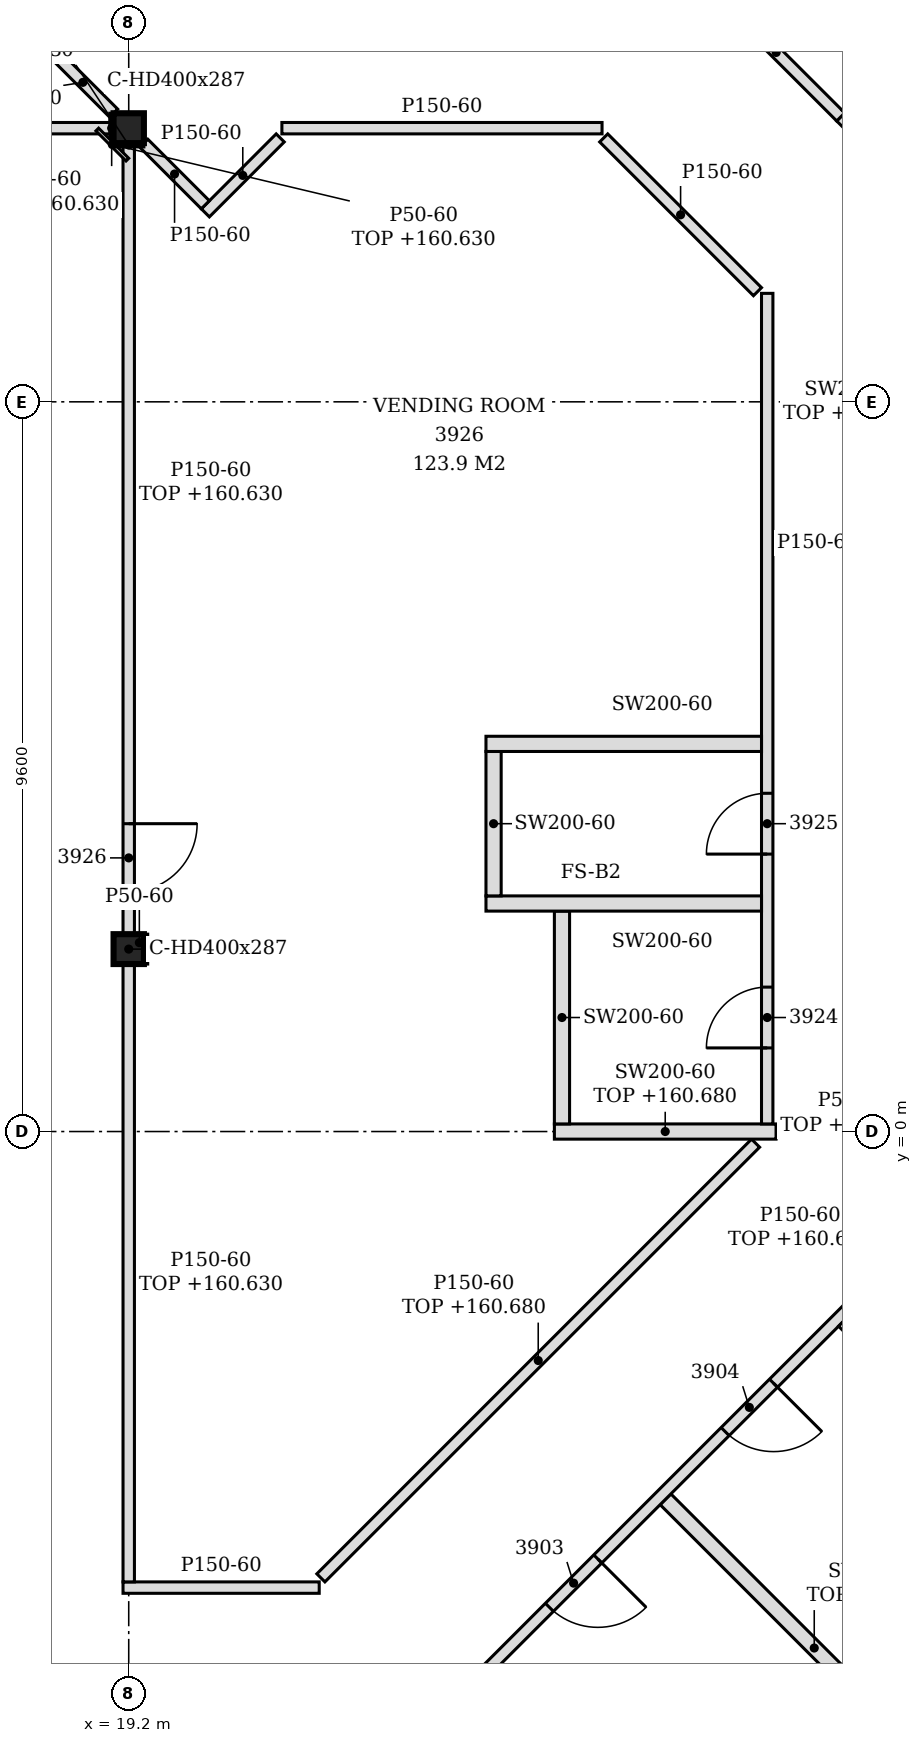
"""IFC4 building model, lengths in metres.
Left out: names, types, materials, properties, quantities, classifications, styles, units other than length and angle.
Written with IfcOpenShell. Run it as: python <this file> out.ifc"""

import sys

from ifc_helpers import new_model, si_unit, direction, frame, frame_2d, origin, origin_2d, place, context, subcontext, project, spatial, polyline, rectangle, i_section, outline, extrude, element, fill, save


model = new_model("IFC4")
c1 = context("Model", 3, precision=1e-05, world=origin(), true_north=direction((0.0, 1.0)))
c2 = subcontext(c1, "Body", "Model", "MODEL_VIEW")
j1 = project(units=[si_unit("LENGTHUNIT", "METRE"), si_unit("PLANEANGLEUNIT", "RADIAN")], contexts=[c1])
p1 = place(None, origin())
s1 = spatial("IfcSite", under=j1, at=p1, CompositionType="ELEMENT")
p2 = place(p1, origin())
s2 = spatial("IfcBuilding", under=s1, at=p2, CompositionType="ELEMENT")
p3 = place(p2, frame((0.0, 0.0, 157.8)))
s3 = spatial("IfcBuildingStorey", under=s2, at=p3, CompositionType="ELEMENT", Elevation=157.8)
for number, where, z_axis, x_axis in (
    (1, (19.2, 2.4, -0.15), (0.0, 0.0, 1.0), (1.0, 0.0, 0.0)),
    (2, (19.2, 13.2, -0.15), (0.0, 0.0, 1.0), (1.0, 0.0, 0.0)),
):
    element("IfcColumn", number, at=place(p3, frame(where, z_axis=z_axis, x_axis=x_axis)), inside=s3, PredefinedType="COLUMN", context=c2, shape_type="SweptSolid", body=[
        extrude(i_section(OverallWidth=0.399, OverallDepth=0.393, WebThickness=0.023, FlangeThickness=0.037, FilletRadius=0.015, at=origin_2d()), origin(), (0.0, 0.0, 1.0), 3.6),
    ])
p4 = place(p3, frame((30.176, -8.752, 0.0), z_axis=(0.0, 0.0, 1.0), x_axis=(-0.707084725798, 0.707128835887, 0.0)))
e3 = element("IfcWall", 3, at=p4, inside=s3, PredefinedType="PARTITIONING", context=c2, shape_type="SweptSolid", body=[
    extrude(rectangle(XDim=5.535, YDim=0.2, at=frame_2d((2.768, 0.0))), origin(), (0.0, 0.0, 1.0), 2.88),
])
p5 = place(p3, frame((22.722, -8.272, 0.0), z_axis=(0.0, 0.0, 1.0), x_axis=(0.707106781187, 0.707106781187, 0.0)))
e4 = element("IfcWall", 4, at=p5, inside=s3, PredefinedType="PARTITIONING", context=c2, shape_type="SweptSolid", body=[
    extrude(rectangle(XDim=10.399, YDim=0.15, at=frame_2d((5.199, 0.0))), origin(), (0.0, 0.0, 1.0), 2.88),
])
p6 = place(p5, frame((2.846, 0.0, 0.0)))
e5 = element("IfcOpeningElement", 5, at=p6, cuts=e4, PredefinedType="OPENING", context=c2, shape_type="SweptSolid", body=[
    extrude(rectangle(XDim=0.9, YDim=2.1, at=frame_2d((0.45, 1.05))), frame((0.0, 0.085, 0.0), z_axis=(0.0, -1.0, 0.0), x_axis=(1.0, 0.0, 0.0)), (0.0, 0.0, 1.0), 0.17),
])
p7 = place(p5, frame((6.116, 0.0, 0.0)))
e6 = element("IfcOpeningElement", 6, at=p7, cuts=e4, PredefinedType="OPENING", context=c2, shape_type="SweptSolid", body=[
    extrude(rectangle(XDim=0.9, YDim=2.1, at=frame_2d((0.45, 1.05))), frame((0.0, 0.085, 0.0), z_axis=(0.0, -1.0, 0.0), x_axis=(1.0, 0.0, 0.0)), (0.0, 0.0, 1.0), 0.17),
])
p8 = place(p3, frame((33.155, -7.107, 0.0), z_axis=(0.0, 0.0, 1.0), x_axis=(-0.70708794033, 0.707125621541, 0.0)))
e7 = element("IfcWall", 7, at=p8, inside=s3, PredefinedType="PARTITIONING", context=c2, shape_type="SweptSolid", body=[
    extrude(rectangle(XDim=6.479, YDim=0.1, at=frame_2d((3.24, 0.0))), origin(), (0.0, 0.0, 1.0), 2.88),
])
p9 = place(p8, frame((2.637, 0.0, 0.0)))
e8 = element("IfcOpeningElement", 8, at=p9, cuts=e7, PredefinedType="OPENING", context=c2, shape_type="SweptSolid", body=[
    extrude(rectangle(XDim=0.9, YDim=2.1, at=frame_2d((0.45, 1.05))), frame((0.0, 0.06, 0.0), z_axis=(0.0, -1.0, 0.0), x_axis=(1.0, 0.0, 0.0)), (0.0, 0.0, 1.0), 0.12),
])
p10 = place(p3, frame((19.125, -6.0, 0.0), z_axis=(0.0, 0.0, 1.0), x_axis=(1.0, 0.0, 0.0)))
e9 = element("IfcWall", 9, at=p10, inside=s3, PredefinedType="PARTITIONING", context=c2, shape_type="SweptSolid", body=[
    extrude(outline(polyline([(0.0, 0.0), (2.581, 0.0), (2.581, 3.45), (0.225, 3.45), (0.223, 2.83), (0.0, 2.83), (0.0, 0.0)])), frame((0.0, 0.075, 0.0), z_axis=(0.0, -1.0, 0.0), x_axis=(1.0, 0.0, 0.0)), (0.0, 0.0, 1.0), 0.15),
])
p11 = place(p3, frame((19.2, -5.925, 0.0), z_axis=(0.0, 0.0, 1.0), x_axis=(0.0, 1.0, 0.0)))
e10 = element("IfcWall", 10, at=p11, inside=s3, PredefinedType="PARTITIONING", context=c2, shape_type="SweptSolid", body=[
    extrude(rectangle(XDim=8.129, YDim=0.15, at=frame_2d((4.064, 0.0))), origin(), (0.0, 0.0, 1.0), 2.83),
])
p12 = place(p3, frame((21.728, -5.872, 0.0), z_axis=(0.0, 0.0, 1.0), x_axis=(0.707106781187, 0.707106781187, 0.0)))
e11 = element("IfcWall", 11, at=p12, inside=s3, PredefinedType="PARTITIONING", context=c2, shape_type="SweptSolid", body=[
    extrude(rectangle(XDim=8.088, YDim=0.15, at=frame_2d((4.044, 0.0))), origin(), (0.0, 0.0, 1.0), 2.88),
])
p13 = place(p3, frame((24.8, 0.0, 0.0), z_axis=(0.0, 0.0, 1.0), x_axis=(1.0, 0.0, 0.0)))
e12 = element("IfcWall", 12, at=p13, inside=s3, PredefinedType="PARTITIONING", context=c2, shape_type="SweptSolid", body=[
    extrude(rectangle(XDim=2.916, YDim=0.2, at=frame_2d((1.458, 0.0))), origin(), (0.0, 0.0, 1.0), 2.88),
])
p14 = place(p3, frame((24.9, 0.1, 0.0), z_axis=(0.0, 0.0, 1.0), x_axis=(0.0, 1.0, 0.0)))
e13 = element("IfcWall", 13, at=p14, inside=s3, PredefinedType="PARTITIONING", context=c2, shape_type="SweptSolid", body=[
    extrude(outline(polyline([(0.0, 0.0), (2.8, 0.0), (2.8, 3.45), (0.005, 3.45), (0.003, 2.88), (0.0, 2.88), (0.0, 0.0)])), frame((0.0, 0.1, 0.0), z_axis=(0.0, -1.0, 0.0), x_axis=(1.0, 0.0, 0.0)), (0.0, 0.0, 1.0), 0.2),
])
p15 = place(p3, frame((27.6, 0.1, 0.0), z_axis=(0.0, 0.0, 1.0), x_axis=(0.0, 1.0, 0.0)))
e14 = element("IfcWall", 14, at=p15, inside=s3, PredefinedType="PARTITIONING", context=c2, shape_type="SweptSolid", body=[
    extrude(outline(polyline([(0.0, 0.0), (10.927, 0.0), (10.927, 3.45), (9.605, 3.45), (9.603, 2.88), (9.395, 2.88), (9.393, 3.45), (4.805, 3.45), (4.803, 2.88), (4.595, 2.88), (4.593, 3.45), (0.005, 3.45), (0.003, 2.88), (0.0, 2.88), (0.0, 0.0)])), frame((0.0, 0.075, 0.0), z_axis=(0.0, -1.0, 0.0), x_axis=(1.0, 0.0, 0.0)), (0.0, 0.0, 1.0), 0.15),
])
p16 = place(p15, frame((1.0, 0.0, 0.0)))
e15 = element("IfcOpeningElement", 15, at=p16, cuts=e14, PredefinedType="OPENING", context=c2, shape_type="SweptSolid", body=[
    extrude(rectangle(XDim=0.8, YDim=2.1, at=frame_2d((0.4, 1.05))), frame((0.0, 0.085, 0.0), z_axis=(0.0, -1.0, 0.0), x_axis=(1.0, 0.0, 0.0)), (0.0, 0.0, 1.0), 0.17),
])
p17 = place(p15, frame((3.55, 0.0, 0.0)))
e16 = element("IfcOpeningElement", 16, at=p17, cuts=e14, PredefinedType="OPENING", context=c2, shape_type="SweptSolid", body=[
    extrude(rectangle(XDim=0.8, YDim=2.1, at=frame_2d((0.4, 1.05))), frame((0.0, 0.085, 0.0), z_axis=(0.0, -1.0, 0.0), x_axis=(1.0, 0.0, 0.0)), (0.0, 0.0, 1.0), 0.17),
])
p18 = place(p3, frame((19.2, 2.596, 0.0), z_axis=(0.0, 0.0, 1.0), x_axis=(0.0, 1.0, 0.0)))
e17 = element("IfcWall", 17, at=p18, inside=s3, PredefinedType="PARTITIONING", context=c2, shape_type="SweptSolid", body=[
    extrude(rectangle(XDim=10.407, YDim=0.15, at=frame_2d((5.204, 0.0))), origin(), (0.0, 0.0, 1.0), 2.83),
])
p19 = place(p18, frame((0.553, 0.0, 0.0)))
e18 = element("IfcOpeningElement", 18, at=p19, cuts=e17, PredefinedType="OPENING", context=c2, shape_type="SweptSolid", body=[
    extrude(rectangle(XDim=0.9, YDim=2.1, at=frame_2d((0.45, 1.05))), frame((0.0, 0.085, 0.0), z_axis=(0.0, -1.0, 0.0), x_axis=(1.0, 0.0, 0.0)), (0.0, 0.0, 1.0), 0.17),
])
p20 = place(p3, frame((23.9, 3.0, 0.0), z_axis=(0.0, 0.0, 1.0), x_axis=(1.0, 0.0, 0.0)))
e19 = element("IfcWall", 19, at=p20, inside=s3, PredefinedType="PARTITIONING", context=c2, shape_type="SweptSolid", body=[
    extrude(rectangle(XDim=3.625, YDim=0.2, at=frame_2d((1.812, 0.0))), origin(), (0.0, 0.0, 1.0), 3.45),
])
p21 = place(p3, frame((24.0, 3.1, 0.0), z_axis=(0.0, 0.0, 1.0), x_axis=(0.0, 1.0, 0.0)))
e20 = element("IfcWall", 20, at=p21, inside=s3, PredefinedType="PARTITIONING", context=c2, shape_type="SweptSolid", body=[
    extrude(outline(polyline([(0.0, 0.0), (1.9, 0.0), (1.9, 3.45), (1.805, 3.45), (1.803, 2.88), (1.595, 2.88), (1.593, 3.45), (0.0, 3.45), (0.0, 0.0)])), frame((0.0, 0.1, 0.0), z_axis=(0.0, -1.0, 0.0), x_axis=(1.0, 0.0, 0.0)), (0.0, 0.0, 1.0), 0.2),
])
p22 = place(p3, frame((23.9, 5.1, 0.0), z_axis=(0.0, 0.0, 1.0), x_axis=(1.0, 0.0, 0.0)))
e21 = element("IfcWall", 21, at=p22, inside=s3, PredefinedType="PARTITIONING", context=c2, shape_type="SweptSolid", body=[
    extrude(rectangle(XDim=3.625, YDim=0.2, at=frame_2d((1.812, 0.0))), origin(), (0.0, 0.0, 1.0), 3.45),
])
p23 = place(p3, frame((27.472, 11.049, 0.0), z_axis=(0.0, 0.0, 1.0), x_axis=(-0.707106781187, 0.707106781187, 0.0)))
e22 = element("IfcWall", 22, at=p23, inside=s3, PredefinedType="PARTITIONING", context=c2, shape_type="SweptSolid", body=[
    extrude(rectangle(XDim=2.861, YDim=0.15, at=frame_2d((1.43, 0.0))), origin(), (0.0, 0.0, 1.0), 3.45),
])
p24 = place(p3, frame((29.872, 12.043, 0.0), z_axis=(0.0, 0.0, 1.0), x_axis=(-0.707172918471, 0.707040637716, 0.0)))
e23 = element("IfcWall", 23, at=p24, inside=s3, PredefinedType="PARTITIONING", context=c2, shape_type="SweptSolid", body=[
    extrude(rectangle(XDim=1.846, YDim=0.15, at=frame_2d((0.923, 0.0))), origin(), (0.0, 0.0, 1.0), 3.45),
])
p25 = place(p3, frame((20.208, 12.086, 0.0), z_axis=(0.0, 0.0, 1.0), x_axis=(0.706756381459, 0.707457007363, 0.0)))
e24 = element("IfcWall", 24, at=p25, inside=s3, PredefinedType="PARTITIONING", context=c2, shape_type="SweptSolid", body=[
    extrude(rectangle(XDim=1.394, YDim=0.15, at=frame_2d((0.697, 0.0))), origin(), (0.0, 0.0, 1.0), 3.45),
])
p26 = place(p3, frame((20.208, 12.192, 0.0), z_axis=(0.0, 0.0, 1.0), x_axis=(-0.70721334539, 0.707000200921, 0.0)))
e25 = element("IfcWall", 25, at=p26, inside=s3, PredefinedType="PARTITIONING", context=c2, shape_type="SweptSolid", body=[
    extrude(rectangle(XDim=1.146, YDim=0.15, at=frame_2d((0.573, 0.0))), origin(), (0.0, 0.0, 1.0), 3.45),
])
p27 = place(p3, frame((7.399, 13.2, 0.0), z_axis=(0.0, 0.0, 1.0), x_axis=(1.0, 0.0, 0.0)))
e26 = element("IfcWall", 26, at=p27, inside=s3, PredefinedType="PARTITIONING", context=c2, shape_type="SweptSolid", body=[
    extrude(rectangle(XDim=11.601, YDim=0.15, at=frame_2d((5.801, 0.0))), origin(), (0.0, 0.0, 1.0), 2.83),
])
p28 = place(p27, frame((2.95, 0.0, 0.0)))
e27 = element("IfcOpeningElement", 27, at=p28, cuts=e26, PredefinedType="OPENING", context=c2, shape_type="SweptSolid", body=[
    extrude(rectangle(XDim=0.9, YDim=2.1, at=frame_2d((0.45, 1.05))), frame((0.0, 0.085, 0.0), z_axis=(0.0, -1.0, 0.0), x_axis=(1.0, 0.0, 0.0)), (0.0, 0.0, 1.0), 0.17),
])
p29 = place(p3, frame((21.215, 13.2, 0.0), z_axis=(0.0, 0.0, 1.0), x_axis=(1.0, 0.0, 0.0)))
e28 = element("IfcWall", 28, at=p29, inside=s3, PredefinedType="PARTITIONING", context=c2, shape_type="SweptSolid", body=[
    extrude(rectangle(XDim=4.212, YDim=0.15, at=frame_2d((2.106, 0.0))), origin(), (0.0, 0.0, 1.0), 3.45),
])
p30 = place(p3, frame((28.567, 13.348, 0.0), z_axis=(0.0, 0.0, 1.0), x_axis=(-0.707310148094, 0.706903355773, 0.0)))
e29 = element("IfcWall", 29, at=p30, inside=s3, PredefinedType="PARTITIONING", context=c2, shape_type="SweptSolid", body=[
    extrude(rectangle(XDim=2.401, YDim=0.15, at=frame_2d((1.2, 0.0))), origin(), (0.0, 0.0, 1.0), 2.88),
])
p31 = place(p3, frame((19.002, 13.398, 0.0), z_axis=(0.0, 0.0, 1.0), x_axis=(-0.707000200921, 0.70721334539, 0.0)))
e30 = element("IfcWall", 30, at=p31, inside=s3, PredefinedType="PARTITIONING", context=c2, shape_type="SweptSolid", body=[
    extrude(rectangle(XDim=1.146, YDim=0.15, at=frame_2d((0.573, 0.0))), origin(), (0.0, 0.0, 1.0), 3.45),
])
p32 = place(p3, frame((28.62, 13.401, 0.0), z_axis=(0.0, 0.0, 1.0), x_axis=(0.707055379538, 0.707158179099, 0.0)))
e31 = element("IfcWall", 31, at=p32, inside=s3, PredefinedType="PARTITIONING", context=c2, shape_type="SweptSolid", body=[
    extrude(rectangle(XDim=2.375, YDim=0.1, at=frame_2d((1.188, 0.0))), origin(), (0.0, 0.0, 1.0), 2.88),
])
p33 = place(p3, frame((18.086, 14.208, 0.0), z_axis=(0.0, 0.0, 1.0), x_axis=(0.70739723372, 0.706816209298, 0.0)))
e32 = element("IfcWall", 32, at=p33, inside=s3, PredefinedType="PARTITIONING", context=c2, shape_type="SweptSolid", body=[
    extrude(rectangle(XDim=1.681, YDim=0.15, at=frame_2d((0.84, 0.0))), origin(), (0.0, 0.0, 1.0), 2.73),
])
p34 = place(p3, frame((19.425, 2.204, 0.0), z_axis=(0.0, 0.0, 1.0), x_axis=(0.0, 1.0, 0.0)))
e33 = element("IfcWall", 33, at=p34, inside=s3, PredefinedType="PARTITIONING", context=c2, shape_type="SweptSolid", body=[
    extrude(rectangle(XDim=0.393, YDim=0.05, at=frame_2d((0.196, 0.0))), origin(), (0.0, 0.0, 1.0), 3.45),
])
p35 = place(p3, frame((18.976, 13.003, 0.0), z_axis=(0.0, 0.0, 1.0), x_axis=(0.0, 1.0, 0.0)))
e34 = element("IfcWall", 34, at=p35, inside=s3, PredefinedType="PARTITIONING", context=c2, shape_type="SweptSolid", body=[
    extrude(rectangle(XDim=0.393, YDim=0.05, at=frame_2d((0.197, 0.0))), origin(), (0.0, 0.0, 1.0), 2.83),
])
p36 = place(p3, frame((19.182, 12.786, 0.0), z_axis=(0.0, 0.0, 1.0), x_axis=(-0.707106781187, 0.707106781187, 0.0)))
e35 = element("IfcWall", 35, at=p36, inside=s3, PredefinedType="PARTITIONING", context=c2, shape_type="SweptSolid", body=[
    extrude(rectangle(XDim=0.56, YDim=0.05, at=frame_2d((0.28, 0.0))), origin(), (0.0, 0.0, 1.0), 2.83),
])
p37 = place(p3, frame((19.0, 12.979, 0.0), z_axis=(0.0, 0.0, 1.0), x_axis=(1.0, 0.0, 0.0)))
e36 = element("IfcWall", 36, at=p37, inside=s3, PredefinedType="PARTITIONING", context=c2, shape_type="SweptSolid", body=[
    extrude(rectangle(XDim=0.399, YDim=0.05, at=frame_2d((0.199, 0.0))), origin(), (0.0, 0.0, 1.0), 2.83),
])
p38 = place(p6, frame((0.9, 0.0, 0.0), z_axis=(0.0, 0.0, 1.0), x_axis=(-1.0, 0.0, 0.0)))
e37 = element("IfcDoor", 37, at=p38, inside=s3, OperationType="SINGLE_SWING_LEFT", PredefinedType="DOOR", context=c2, shape_type="SweptSolid", body=[
    extrude(rectangle(XDim=0.9, YDim=2.1, at=frame_2d((0.45, 1.05))), frame((0.0, 0.025, 0.0), z_axis=(0.0, -1.0, 0.0), x_axis=(1.0, 0.0, 0.0)), (0.0, 0.0, 1.0), 0.05),
])
fill(e5, e37)
p39 = place(p7, frame((0.9, 0.0, 0.0), z_axis=(0.0, 0.0, 1.0), x_axis=(-1.0, 0.0, 0.0)))
e38 = element("IfcDoor", 38, at=p39, inside=s3, OperationType="SINGLE_SWING_LEFT", PredefinedType="DOOR", context=c2, shape_type="SweptSolid", body=[
    extrude(rectangle(XDim=0.9, YDim=2.1, at=frame_2d((0.45, 1.05))), frame((0.0, 0.025, 0.0), z_axis=(0.0, -1.0, 0.0), x_axis=(1.0, 0.0, 0.0)), (0.0, 0.0, 1.0), 0.05),
])
fill(e6, e38)
p40 = place(p16, origin())
e39 = element("IfcDoor", 39, at=p40, inside=s3, OperationType="SINGLE_SWING_LEFT", PredefinedType="DOOR", context=c2, shape_type="SweptSolid", body=[
    extrude(rectangle(XDim=0.8, YDim=2.1, at=frame_2d((0.4, 1.05))), frame((0.0, 0.025, 0.0), z_axis=(0.0, -1.0, 0.0), x_axis=(1.0, 0.0, 0.0)), (0.0, 0.0, 1.0), 0.05),
])
fill(e15, e39)
p41 = place(p17, origin())
e40 = element("IfcDoor", 40, at=p41, inside=s3, OperationType="SINGLE_SWING_LEFT", PredefinedType="DOOR", context=c2, shape_type="SweptSolid", body=[
    extrude(rectangle(XDim=0.8, YDim=2.1, at=frame_2d((0.4, 1.05))), frame((0.0, 0.025, 0.0), z_axis=(0.0, -1.0, 0.0), x_axis=(1.0, 0.0, 0.0)), (0.0, 0.0, 1.0), 0.05),
])
fill(e16, e40)
p42 = place(p19, frame((0.9, 0.0, 0.0), z_axis=(0.0, 0.0, 1.0), x_axis=(-1.0, 0.0, 0.0)))
e41 = element("IfcDoor", 41, at=p42, inside=s3, OperationType="SINGLE_SWING_LEFT", PredefinedType="DOOR", context=c2, shape_type="SweptSolid", body=[
    extrude(rectangle(XDim=0.9, YDim=2.1, at=frame_2d((0.45, 1.05))), frame((0.0, 0.025, 0.0), z_axis=(0.0, -1.0, 0.0), x_axis=(1.0, 0.0, 0.0)), (0.0, 0.0, 1.0), 0.05),
])
fill(e18, e41)
save(model, sys.argv[1])
